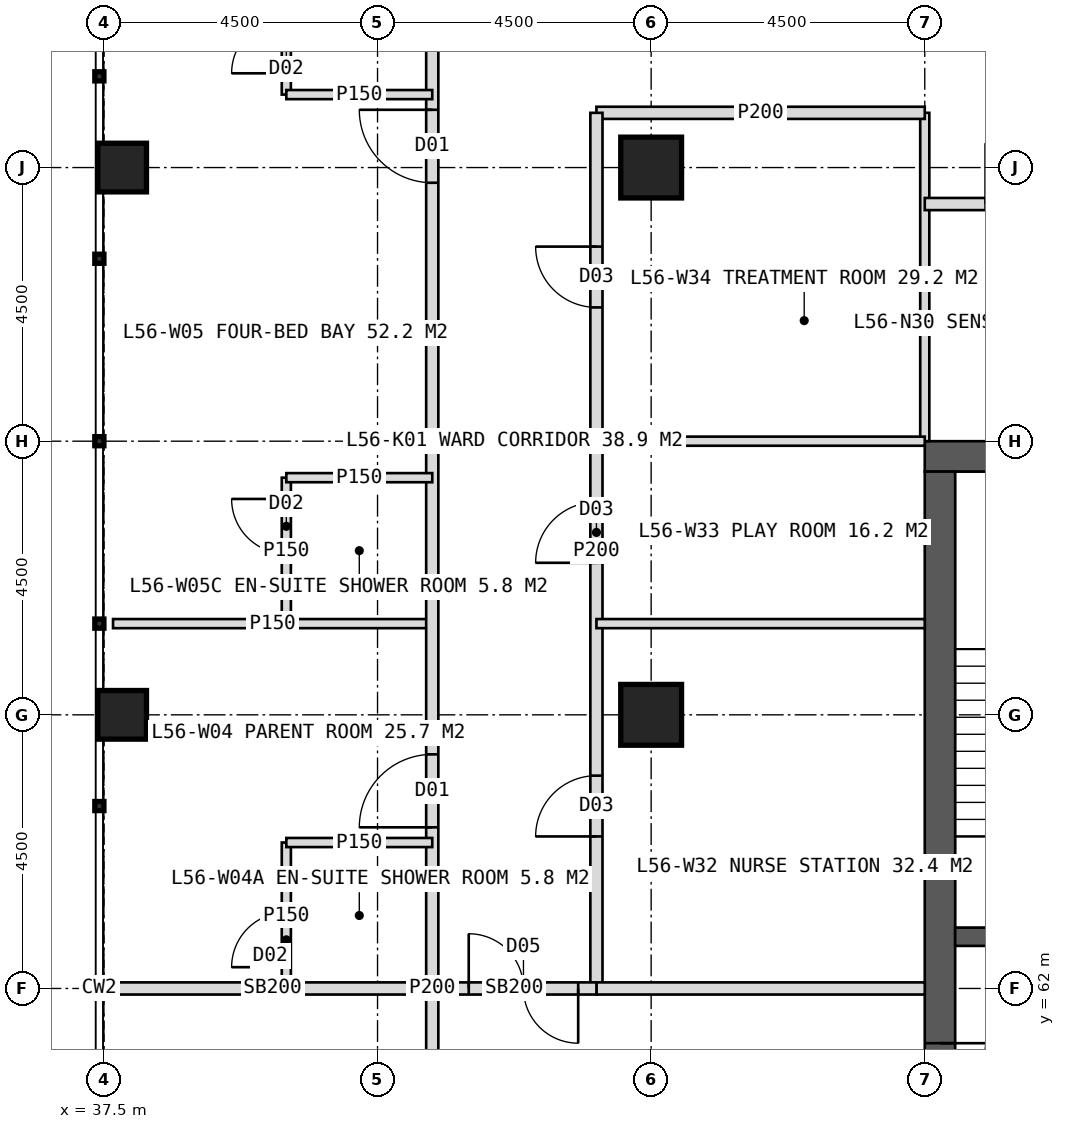
"""IFC4 building model, lengths in metres.
Left out: names, types, materials, properties, quantities, classifications, styles, units other than length and angle.
Written with IfcOpenShell. Run it as: python <this file> out.ifc"""

import sys

from ifc_helpers import new_model, si_unit, direction, frame, frame_2d, origin, origin_2d, place, context, subcontext, project, spatial, rectangle, hollow_rectangle, extrude, element, fill, save


model = new_model("IFC4")
c1 = context("Model", 3, precision=1e-05, world=origin(), true_north=direction((0.0, 1.0)))
c2 = subcontext(c1, "Body", "Model", "MODEL_VIEW")
j1 = project(units=[si_unit("LENGTHUNIT", "METRE"), si_unit("PLANEANGLEUNIT", "RADIAN")], contexts=[c1])
p1 = place(None, origin())
s1 = spatial("IfcSite", under=j1, at=p1, CompositionType="ELEMENT")
p2 = place(p1, origin())
s2 = spatial("IfcBuilding", under=s1, at=p2, CompositionType="ELEMENT")
p3 = place(p2, frame((0.0, 0.0, 233.0)))
s3 = spatial("IfcBuildingStorey", under=s2, at=p3, CompositionType="ELEMENT", Elevation=233.0)
p4 = place(p3, frame((51.0, 70.75, 0.0), z_axis=(0.0, 0.0, 1.0), x_axis=(1.0, 0.0, 0.0)))
e1 = element("IfcWall", 1, at=p4, inside=s3, PredefinedType="SHEAR", context=c2, shape_type="SweptSolid", body=[
    extrude(rectangle(XDim=18.0, YDim=0.5, at=frame_2d((9.0, 0.0))), origin(), (0.0, 0.0, 1.0), 4.0),
])
p5 = place(p4, frame((8.1, 0.0, 0.0)))
e2 = element("IfcOpeningElement", 2, at=p5, cuts=e1, PredefinedType="OPENING", context=c2, shape_type="SweptSolid", body=[
    extrude(rectangle(XDim=1.8, YDim=2.2, at=frame_2d((0.9, 1.1))), frame((0.0, 0.26, 0.0), z_axis=(0.0, -1.0, 0.0), x_axis=(1.0, 0.0, 0.0)), (0.0, 0.0, 1.0), 0.52),
])
p6 = place(p3, frame((51.25, 53.5, 0.0), z_axis=(0.0, 0.0, 1.0), x_axis=(0.0, 1.0, 0.0)))
e3 = element("IfcWall", 3, at=p6, inside=s3, PredefinedType="SHEAR", context=c2, shape_type="SweptSolid", body=[
    extrude(rectangle(XDim=17.0, YDim=0.5, at=frame_2d((8.5, 0.0))), origin(), (0.0, 0.0, 1.0), 4.0),
])
p7 = place(p6, frame((6.1, 0.0, 0.0)))
e4 = element("IfcOpeningElement", 4, at=p7, cuts=e3, PredefinedType="OPENING", context=c2, shape_type="SweptSolid", body=[
    extrude(rectangle(XDim=1.5, YDim=2.2, at=frame_2d((0.75, 1.1))), frame((0.0, 0.26, 0.0), z_axis=(0.0, -1.0, 0.0), x_axis=(1.0, 0.0, 0.0)), (0.0, 0.0, 1.0), 0.52),
])
p8 = place(p3, frame((51.5, 62.85, 0.0), z_axis=(0.0, 0.0, 1.0), x_axis=(1.0, 0.0, 0.0)))
e5 = element("IfcWall", 5, at=p8, inside=s3, PredefinedType="SHEAR", context=c2, shape_type="SweptSolid", body=[
    extrude(rectangle(XDim=3.3, YDim=0.3, at=frame_2d((1.65, 0.0))), origin(), (0.0, 0.0, 1.0), 4.0),
])
p9 = place(p8, frame((1.15, 0.0, 0.0)))
e6 = element("IfcOpeningElement", 6, at=p9, cuts=e5, PredefinedType="OPENING", context=c2, shape_type="SweptSolid", body=[
    extrude(rectangle(XDim=1.2, YDim=2.1, at=frame_2d((0.6, 1.05))), frame((0.0, 0.16, 0.0), z_axis=(0.0, -1.0, 0.0), x_axis=(1.0, 0.0, 0.0)), (0.0, 0.0, 1.0), 0.32),
])
for number, where, z_axis, x_axis in (
    (7, (46.5, 75.5, 0.0), (0.0, 0.0, 1.0), (1.0, 0.0, 0.0)),
    (8, (46.5, 66.5, 0.0), (0.0, 0.0, 1.0), (1.0, 0.0, 0.0)),
):
    element("IfcColumn", number, at=place(p3, frame(where, z_axis=z_axis, x_axis=x_axis)), inside=s3, PredefinedType="COLUMN", context=c2, shape_type="SweptSolid", body=[
        extrude(hollow_rectangle(XDim=1.0, YDim=1.0, WallThickness=0.1, at=origin_2d()), origin(), (0.0, 0.0, 1.0), 4.0),
    ])
for number, where, z_axis, x_axis in (
    (9, (37.8, 66.5, 0.0), (0.0, 0.0, 1.0), (1.0, 0.0, 0.0)),
    (10, (37.8, 75.5, 0.0), (0.0, 0.0, 1.0), (1.0, 0.0, 0.0)),
):
    element("IfcColumn", number, at=place(p3, frame(where, z_axis=z_axis, x_axis=x_axis)), inside=s3, PredefinedType="COLUMN", context=c2, shape_type="SweptSolid", body=[
        extrude(hollow_rectangle(XDim=0.8, YDim=0.8, WallThickness=0.08, at=origin_2d()), origin(), (0.0, 0.0, 1.0), 4.0),
    ])
p10 = place(p3, frame((51.0, 71.0, 0.0), z_axis=(0.0, 0.0, 1.0), x_axis=(0.0, 1.0, 0.0)))
e11 = element("IfcWall", 11, at=p10, inside=s3, PredefinedType="PARTITIONING", context=c2, shape_type="SweptSolid", body=[
    extrude(rectangle(XDim=5.4, YDim=0.15, at=frame_2d((2.7, 0.0))), origin(), (0.0, 0.0, 1.0), 3.75),
])
p11 = place(p3, frame((45.6, 76.4, 0.0), z_axis=(0.0, 0.0, 1.0), x_axis=(1.0, 0.0, 0.0)))
e12 = element("IfcWall", 12, at=p11, inside=s3, PredefinedType="PARTITIONING", context=c2, shape_type="SweptSolid", body=[
    extrude(rectangle(XDim=5.4, YDim=0.2, at=frame_2d((2.7, 0.0))), origin(), (0.0, 0.0, 1.0), 3.75),
])
p12 = place(p3, frame((51.0, 74.9, 0.0), z_axis=(0.0, 0.0, 1.0), x_axis=(1.0, 0.0, 0.0)))
e13 = element("IfcWall", 13, at=p12, inside=s3, PredefinedType="PARTITIONING", context=c2, shape_type="SweptSolid", body=[
    extrude(rectangle(XDim=6.75, YDim=0.2, at=frame_2d((3.375, 0.0))), origin(), (0.0, 0.0, 1.0), 3.75),
])
p13 = place(p12, frame((1.0, 0.0, 0.0)))
e14 = element("IfcOpeningElement", 14, at=p13, cuts=e13, PredefinedType="OPENING", context=c2, shape_type="SweptSolid", body=[
    extrude(rectangle(XDim=1.0, YDim=2.1, at=frame_2d((0.5, 1.05))), frame((0.0, 0.11, 0.0), z_axis=(0.0, -1.0, 0.0), x_axis=(1.0, 0.0, 0.0)), (0.0, 0.0, 1.0), 0.22),
])
p14 = place(p12, frame((5.425, 0.0, 0.0)))
e15 = element("IfcOpeningElement", 15, at=p14, cuts=e13, PredefinedType="OPENING", context=c2, shape_type="SweptSolid", body=[
    extrude(rectangle(XDim=1.0, YDim=2.1, at=frame_2d((0.5, 1.05))), frame((0.0, 0.11, 0.0), z_axis=(0.0, -1.0, 0.0), x_axis=(1.0, 0.0, 0.0)), (0.0, 0.0, 1.0), 0.22),
])
p15 = place(p3, frame((42.9, 62.0, 0.0), z_axis=(0.0, 0.0, 1.0), x_axis=(-1.0, 0.0, 0.0)))
e16 = element("IfcWall", 16, at=p15, inside=s3, PredefinedType="SOLIDWALL", context=c2, shape_type="SweptSolid", body=[
    extrude(rectangle(XDim=5.25, YDim=0.2, at=frame_2d((2.625, 0.0))), origin(), (0.0, 0.0, 1.0), 2.95),
])
p16 = place(p3, frame((42.9, 68.0, 0.0), z_axis=(0.0, 0.0, 1.0), x_axis=(-1.0, 0.0, 0.0)))
e17 = element("IfcWall", 17, at=p16, inside=s3, PredefinedType="PARTITIONING", context=c2, shape_type="SweptSolid", body=[
    extrude(rectangle(XDim=5.25, YDim=0.15, at=frame_2d((2.625, 0.0))), origin(), (0.0, 0.0, 1.0), 3.75),
])
p17 = place(p3, frame((42.9, 44.9, 0.0), z_axis=(0.0, 0.0, 1.0), x_axis=(0.0, 1.0, 0.0)))
e18 = element("IfcWall", 18, at=p17, inside=s3, PredefinedType="PARTITIONING", context=c2, shape_type="SweptSolid", body=[
    extrude(rectangle(XDim=34.2, YDim=0.2, at=frame_2d((17.1, 0.0))), origin(), (0.0, 0.0, 1.0), 3.75),
])
p18 = place(p17, frame((1.25, 0.0, 0.0)))
e19 = element("IfcOpeningElement", 19, at=p18, cuts=e18, PredefinedType="OPENING", context=c2, shape_type="SweptSolid", body=[
    extrude(rectangle(XDim=1.2, YDim=2.2, at=frame_2d((0.6, 1.1))), frame((0.0, 0.11, 0.0), z_axis=(0.0, -1.0, 0.0), x_axis=(1.0, 0.0, 0.0)), (0.0, 0.0, 1.0), 0.22),
])
p19 = place(p17, frame((7.75, 0.0, 0.0)))
e20 = element("IfcOpeningElement", 20, at=p19, cuts=e18, PredefinedType="OPENING", context=c2, shape_type="SweptSolid", body=[
    extrude(rectangle(XDim=1.2, YDim=2.2, at=frame_2d((0.6, 1.1))), frame((0.0, 0.11, 0.0), z_axis=(0.0, -1.0, 0.0), x_axis=(1.0, 0.0, 0.0)), (0.0, 0.0, 1.0), 0.22),
])
p20 = place(p17, frame((13.6, 0.0, 0.0)))
e21 = element("IfcOpeningElement", 21, at=p20, cuts=e18, PredefinedType="OPENING", context=c2, shape_type="SweptSolid", body=[
    extrude(rectangle(XDim=1.0, YDim=2.1, at=frame_2d((0.5, 1.05))), frame((0.0, 0.11, 0.0), z_axis=(0.0, -1.0, 0.0), x_axis=(1.0, 0.0, 0.0)), (0.0, 0.0, 1.0), 0.22),
])
p21 = place(p17, frame((19.75, 0.0, 0.0)))
e22 = element("IfcOpeningElement", 22, at=p21, cuts=e18, PredefinedType="OPENING", context=c2, shape_type="SweptSolid", body=[
    extrude(rectangle(XDim=1.2, YDim=2.2, at=frame_2d((0.6, 1.1))), frame((0.0, 0.11, 0.0), z_axis=(0.0, -1.0, 0.0), x_axis=(1.0, 0.0, 0.0)), (0.0, 0.0, 1.0), 0.22),
])
p22 = place(p17, frame((30.35, 0.0, 0.0)))
e23 = element("IfcOpeningElement", 23, at=p22, cuts=e18, PredefinedType="OPENING", context=c2, shape_type="SweptSolid", body=[
    extrude(rectangle(XDim=1.2, YDim=2.2, at=frame_2d((0.6, 1.1))), frame((0.0, 0.11, 0.0), z_axis=(0.0, -1.0, 0.0), x_axis=(1.0, 0.0, 0.0)), (0.0, 0.0, 1.0), 0.22),
])
p23 = place(p3, frame((40.5, 62.0, 0.0), z_axis=(0.0, 0.0, 1.0), x_axis=(0.0, 1.0, 0.0)))
e24 = element("IfcWall", 24, at=p23, inside=s3, PredefinedType="PARTITIONING", context=c2, shape_type="SweptSolid", body=[
    extrude(rectangle(XDim=2.4, YDim=0.15, at=frame_2d((1.2, 0.0))), origin(), (0.0, 0.0, 1.0), 3.75),
])
p24 = place(p23, frame((0.35, 0.0, 0.0)))
e25 = element("IfcOpeningElement", 25, at=p24, cuts=e24, PredefinedType="OPENING", context=c2, shape_type="SweptSolid", body=[
    extrude(rectangle(XDim=0.9, YDim=2.1, at=frame_2d((0.45, 1.05))), frame((0.0, 0.085, 0.0), z_axis=(0.0, -1.0, 0.0), x_axis=(1.0, 0.0, 0.0)), (0.0, 0.0, 1.0), 0.17),
])
p25 = place(p3, frame((42.9, 64.4, 0.0), z_axis=(0.0, 0.0, 1.0), x_axis=(-1.0, 0.0, 0.0)))
e26 = element("IfcWall", 26, at=p25, inside=s3, PredefinedType="PARTITIONING", context=c2, shape_type="SweptSolid", body=[
    extrude(rectangle(XDim=2.4, YDim=0.15, at=frame_2d((1.2, 0.0))), origin(), (0.0, 0.0, 1.0), 3.75),
])
p26 = place(p3, frame((40.5, 76.7, 0.0), z_axis=(0.0, 0.0, 1.0), x_axis=(0.0, 1.0, 0.0)))
e27 = element("IfcWall", 27, at=p26, inside=s3, PredefinedType="PARTITIONING", context=c2, shape_type="SweptSolid", body=[
    extrude(rectangle(XDim=2.4, YDim=0.15, at=frame_2d((1.2, 0.0))), origin(), (0.0, 0.0, 1.0), 3.75),
])
p27 = place(p26, frame((0.35, 0.0, 0.0)))
e28 = element("IfcOpeningElement", 28, at=p27, cuts=e27, PredefinedType="OPENING", context=c2, shape_type="SweptSolid", body=[
    extrude(rectangle(XDim=0.9, YDim=2.1, at=frame_2d((0.45, 1.05))), frame((0.0, 0.085, 0.0), z_axis=(0.0, -1.0, 0.0), x_axis=(1.0, 0.0, 0.0)), (0.0, 0.0, 1.0), 0.17),
])
p28 = place(p3, frame((42.9, 76.7, 0.0), z_axis=(0.0, 0.0, 1.0), x_axis=(-1.0, 0.0, 0.0)))
e29 = element("IfcWall", 29, at=p28, inside=s3, PredefinedType="PARTITIONING", context=c2, shape_type="SweptSolid", body=[
    extrude(rectangle(XDim=2.4, YDim=0.15, at=frame_2d((1.2, 0.0))), origin(), (0.0, 0.0, 1.0), 3.75),
])
p29 = place(p3, frame((40.5, 68.0, 0.0), z_axis=(0.0, 0.0, 1.0), x_axis=(0.0, 1.0, 0.0)))
e30 = element("IfcWall", 30, at=p29, inside=s3, PredefinedType="PARTITIONING", context=c2, shape_type="SweptSolid", body=[
    extrude(rectangle(XDim=2.4, YDim=0.15, at=frame_2d((1.2, 0.0))), origin(), (0.0, 0.0, 1.0), 3.75),
])
p30 = place(p29, frame((1.15, 0.0, 0.0)))
e31 = element("IfcOpeningElement", 31, at=p30, cuts=e30, PredefinedType="OPENING", context=c2, shape_type="SweptSolid", body=[
    extrude(rectangle(XDim=0.9, YDim=2.1, at=frame_2d((0.45, 1.05))), frame((0.0, 0.085, 0.0), z_axis=(0.0, -1.0, 0.0), x_axis=(1.0, 0.0, 0.0)), (0.0, 0.0, 1.0), 0.17),
])
p31 = place(p3, frame((42.9, 70.4, 0.0), z_axis=(0.0, 0.0, 1.0), x_axis=(-1.0, 0.0, 0.0)))
e32 = element("IfcWall", 32, at=p31, inside=s3, PredefinedType="PARTITIONING", context=c2, shape_type="SweptSolid", body=[
    extrude(rectangle(XDim=2.4, YDim=0.15, at=frame_2d((1.2, 0.0))), origin(), (0.0, 0.0, 1.0), 3.75),
])
p32 = place(p3, frame((45.6, 62.0, 0.0), z_axis=(0.0, 0.0, 1.0), x_axis=(0.0, 1.0, 0.0)))
e33 = element("IfcWall", 33, at=p32, inside=s3, PredefinedType="PARTITIONING", context=c2, shape_type="SweptSolid", body=[
    extrude(rectangle(XDim=14.4, YDim=0.2, at=frame_2d((7.2, 0.0))), origin(), (0.0, 0.0, 1.0), 3.75),
])
p33 = place(p32, frame((2.5, 0.0, 0.0)))
e34 = element("IfcOpeningElement", 34, at=p33, cuts=e33, PredefinedType="OPENING", context=c2, shape_type="SweptSolid", body=[
    extrude(rectangle(XDim=1.0, YDim=2.1, at=frame_2d((0.5, 1.05))), frame((0.0, 0.11, 0.0), z_axis=(0.0, -1.0, 0.0), x_axis=(1.0, 0.0, 0.0)), (0.0, 0.0, 1.0), 0.22),
])
p34 = place(p32, frame((7.0, 0.0, 0.0)))
e35 = element("IfcOpeningElement", 35, at=p34, cuts=e33, PredefinedType="OPENING", context=c2, shape_type="SweptSolid", body=[
    extrude(rectangle(XDim=1.0, YDim=2.1, at=frame_2d((0.5, 1.05))), frame((0.0, 0.11, 0.0), z_axis=(0.0, -1.0, 0.0), x_axis=(1.0, 0.0, 0.0)), (0.0, 0.0, 1.0), 0.22),
])
p35 = place(p32, frame((11.2, 0.0, 0.0)))
e36 = element("IfcOpeningElement", 36, at=p35, cuts=e33, PredefinedType="OPENING", context=c2, shape_type="SweptSolid", body=[
    extrude(rectangle(XDim=1.0, YDim=2.1, at=frame_2d((0.5, 1.05))), frame((0.0, 0.11, 0.0), z_axis=(0.0, -1.0, 0.0), x_axis=(1.0, 0.0, 0.0)), (0.0, 0.0, 1.0), 0.22),
])
p36 = place(p3, frame((51.0, 62.0, 0.0), z_axis=(0.0, 0.0, 1.0), x_axis=(-1.0, 0.0, 0.0)))
e37 = element("IfcWall", 37, at=p36, inside=s3, PredefinedType="SOLIDWALL", context=c2, shape_type="SweptSolid", body=[
    extrude(rectangle(XDim=5.4, YDim=0.2, at=frame_2d((2.7, 0.0))), origin(), (0.0, 0.0, 1.0), 2.95),
])
for number, where, z_axis, x_axis in (
    (38, (51.0, 68.0, 0.0), (0.0, 0.0, 1.0), (-1.0, 0.0, 0.0)),
    (39, (51.0, 71.0, 0.0), (0.0, 0.0, 1.0), (-1.0, 0.0, 0.0)),
):
    element("IfcWall", number, at=place(p3, frame(where, z_axis=z_axis, x_axis=x_axis)), inside=s3, PredefinedType="PARTITIONING", context=c2, shape_type="SweptSolid", body=[
        extrude(rectangle(XDim=5.4, YDim=0.15, at=frame_2d((2.7, 0.0))), origin(), (0.0, 0.0, 1.0), 3.75),
    ])
p37 = place(p3, frame((45.6, 62.0, 0.0), z_axis=(0.0, 0.0, 1.0), x_axis=(-1.0, 0.0, 0.0)))
e40 = element("IfcWall", 40, at=p37, inside=s3, PredefinedType="SOLIDWALL", context=c2, shape_type="SweptSolid", body=[
    extrude(rectangle(XDim=2.7, YDim=0.2, at=frame_2d((1.35, 0.0))), origin(), (0.0, 0.0, 1.0), 2.95),
])
p38 = place(p37, frame((0.3, 0.0, 0.0)))
e41 = element("IfcOpeningElement", 41, at=p38, cuts=e40, PredefinedType="OPENING", context=c2, shape_type="SweptSolid", body=[
    extrude(rectangle(XDim=1.8, YDim=2.2, at=frame_2d((0.9, 1.1))), frame((0.0, 0.11, 0.0), z_axis=(0.0, -1.0, 0.0), x_axis=(1.0, 0.0, 0.0)), (0.0, 0.0, 1.0), 0.22),
])
p39 = place(p21, origin())
e42 = element("IfcDoor", 42, at=p39, inside=s3, OperationType="SINGLE_SWING_LEFT", PredefinedType="DOOR", context=c2, shape_type="SweptSolid", body=[
    extrude(rectangle(XDim=1.2, YDim=2.2, at=frame_2d((0.6, 1.1))), frame((0.0, 0.025, 0.0), z_axis=(0.0, -1.0, 0.0), x_axis=(1.0, 0.0, 0.0)), (0.0, 0.0, 1.0), 0.05),
])
fill(e22, e42)
p40 = place(p24, origin())
e43 = element("IfcDoor", 43, at=p40, inside=s3, OperationType="SINGLE_SWING_LEFT", PredefinedType="DOOR", context=c2, shape_type="SweptSolid", body=[
    extrude(rectangle(XDim=0.9, YDim=2.1, at=frame_2d((0.45, 1.05))), frame((0.0, 0.025, 0.0), z_axis=(0.0, -1.0, 0.0), x_axis=(1.0, 0.0, 0.0)), (0.0, 0.0, 1.0), 0.05),
])
fill(e25, e43)
p41 = place(p22, origin())
e44 = element("IfcDoor", 44, at=p41, inside=s3, OperationType="SINGLE_SWING_RIGHT", PredefinedType="DOOR", context=c2, shape_type="SweptSolid", body=[
    extrude(rectangle(XDim=1.2, YDim=2.2, at=frame_2d((0.6, 1.1))), frame((0.0, 0.025, 0.0), z_axis=(0.0, -1.0, 0.0), x_axis=(1.0, 0.0, 0.0)), (0.0, 0.0, 1.0), 0.05),
])
fill(e23, e44)
p42 = place(p27, origin())
e45 = element("IfcDoor", 45, at=p42, inside=s3, OperationType="SINGLE_SWING_LEFT", PredefinedType="DOOR", context=c2, shape_type="SweptSolid", body=[
    extrude(rectangle(XDim=0.9, YDim=2.1, at=frame_2d((0.45, 1.05))), frame((0.0, 0.025, 0.0), z_axis=(0.0, -1.0, 0.0), x_axis=(1.0, 0.0, 0.0)), (0.0, 0.0, 1.0), 0.05),
])
fill(e28, e45)
p43 = place(p30, origin())
e46 = element("IfcDoor", 46, at=p43, inside=s3, OperationType="SINGLE_SWING_RIGHT", PredefinedType="DOOR", context=c2, shape_type="SweptSolid", body=[
    extrude(rectangle(XDim=0.9, YDim=2.1, at=frame_2d((0.45, 1.05))), frame((0.0, 0.025, 0.0), z_axis=(0.0, -1.0, 0.0), x_axis=(1.0, 0.0, 0.0)), (0.0, 0.0, 1.0), 0.05),
])
fill(e31, e46)
p44 = place(p33, origin())
e47 = element("IfcDoor", 47, at=p44, inside=s3, OperationType="SINGLE_SWING_LEFT", PredefinedType="DOOR", context=c2, shape_type="SweptSolid", body=[
    extrude(rectangle(XDim=1.0, YDim=2.1, at=frame_2d((0.5, 1.05))), frame((0.0, 0.025, 0.0), z_axis=(0.0, -1.0, 0.0), x_axis=(1.0, 0.0, 0.0)), (0.0, 0.0, 1.0), 0.05),
])
fill(e34, e47)
p45 = place(p34, origin())
e48 = element("IfcDoor", 48, at=p45, inside=s3, OperationType="SINGLE_SWING_LEFT", PredefinedType="DOOR", context=c2, shape_type="SweptSolid", body=[
    extrude(rectangle(XDim=1.0, YDim=2.1, at=frame_2d((0.5, 1.05))), frame((0.0, 0.025, 0.0), z_axis=(0.0, -1.0, 0.0), x_axis=(1.0, 0.0, 0.0)), (0.0, 0.0, 1.0), 0.05),
])
fill(e35, e48)
p46 = place(p35, origin())
e49 = element("IfcDoor", 49, at=p46, inside=s3, OperationType="SINGLE_SWING_RIGHT", PredefinedType="DOOR", context=c2, shape_type="SweptSolid", body=[
    extrude(rectangle(XDim=1.0, YDim=2.1, at=frame_2d((0.5, 1.05))), frame((0.0, 0.025, 0.0), z_axis=(0.0, -1.0, 0.0), x_axis=(1.0, 0.0, 0.0)), (0.0, 0.0, 1.0), 0.05),
])
fill(e36, e49)
p47 = place(p38, origin())
e50 = element("IfcDoor", 50, at=p47, inside=s3, OperationType="DOUBLE_DOOR_DOUBLE_SWING", PredefinedType="DOOR", context=c2, shape_type="SweptSolid", body=[
    extrude(rectangle(XDim=1.8, YDim=2.2, at=frame_2d((0.9, 1.1))), frame((0.0, 0.025, 0.0), z_axis=(0.0, -1.0, 0.0), x_axis=(1.0, 0.0, 0.0)), (0.0, 0.0, 1.0), 0.05),
])
fill(e41, e50)
p48 = place(p7, origin())
e51 = element("IfcDoor", 51, at=p48, inside=s3, OperationType="DOUBLE_DOOR_SINGLE_SWING", PredefinedType="DOOR", context=c2, shape_type="SweptSolid", body=[
    extrude(rectangle(XDim=1.5, YDim=2.2, at=frame_2d((0.75, 1.1))), frame((0.0, 0.025, 0.0), z_axis=(0.0, -1.0, 0.0), x_axis=(1.0, 0.0, 0.0)), (0.0, 0.0, 1.0), 0.05),
])
fill(e4, e51)
save(model, sys.argv[1])
